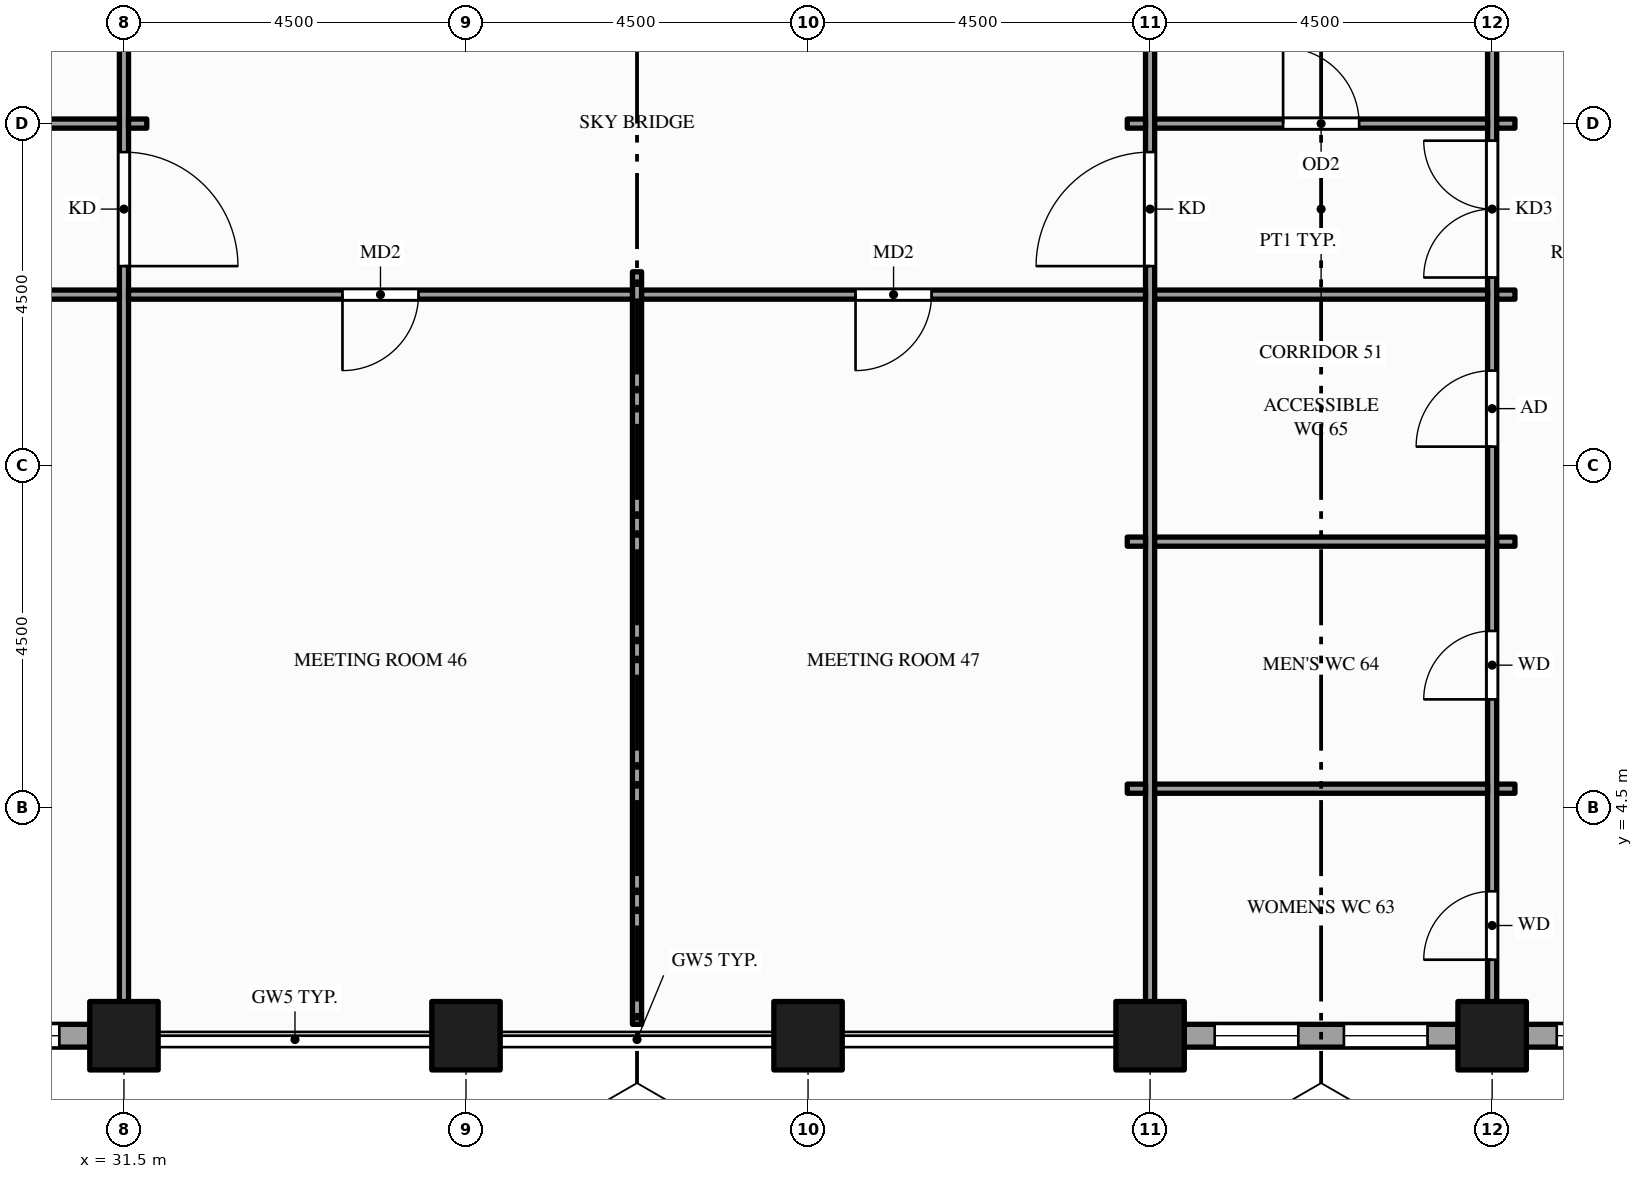
"""IFC4 building model, lengths in metres.
Left out: names, types, materials, properties, quantities, classifications, styles, units other than length and angle.
Written with IfcOpenShell. Run it as: python <this file> out.ifc"""

import sys

from ifc_helpers import new_model, si_unit, direction, frame, frame_2d, origin, origin_2d, place, context, subcontext, project, spatial, rectangle, hollow_rectangle, extrude, element, fill, save


model = new_model("IFC4")
c1 = context("Model", 3, precision=1e-05, world=origin(), true_north=direction((0.0, 1.0)))
c2 = subcontext(c1, "Body", "Model", "MODEL_VIEW")
j1 = project(units=[si_unit("LENGTHUNIT", "METRE"), si_unit("PLANEANGLEUNIT", "RADIAN")], contexts=[c1])
p1 = place(None, origin())
s1 = spatial("IfcSite", under=j1, at=p1, CompositionType="ELEMENT")
p2 = place(p1, origin())
s2 = spatial("IfcBuilding", under=s1, at=p2, CompositionType="ELEMENT")
p3 = place(p2, frame((0.0, 0.0, 155.0)))
s3 = spatial("IfcBuildingStorey", under=s2, at=p3, CompositionType="ELEMENT", Elevation=155.0)
for number, where, z_axis, x_axis in (
    (1, (31.5, 1.5, -0.15), (0.0, 0.0, 1.0), (1.0, 0.0, 0.0)),
    (2, (36.0, 1.5, -0.15), (0.0, 0.0, 1.0), (1.0, 0.0, 0.0)),
    (3, (40.5, 1.5, -0.15), (0.0, 0.0, 1.0), (1.0, 0.0, 0.0)),
    (4, (45.0, 1.5, -0.15), (0.0, 0.0, 1.0), (1.0, 0.0, 0.0)),
    (5, (49.5, 1.5, -0.15), (0.0, 0.0, 1.0), (1.0, 0.0, 0.0)),
):
    element("IfcColumn", number, at=place(p3, frame(where, z_axis=z_axis, x_axis=x_axis)), inside=s3, PredefinedType="COLUMN", context=c2, shape_type="SweptSolid", body=[
        extrude(hollow_rectangle(XDim=0.9, YDim=0.9, WallThickness=0.045, at=origin_2d()), origin(), (0.0, 0.0, 1.0), 4.0),
    ])
p4 = place(p3, frame((27.45, 1.5, 0.0), z_axis=(0.0, 0.0, 1.0), x_axis=(1.0, 0.0, 0.0)))
e6 = element("IfcWall", 6, at=p4, inside=s3, PredefinedType="STANDARD", context=c2, shape_type="SweptSolid", body=[
    extrude(rectangle(XDim=3.6, YDim=0.3, at=frame_2d((1.8, 0.0))), origin(), (0.0, 0.0, 1.0), 2.87),
])
p5 = place(p4, frame((0.4, 0.0, 0.9)))
e7 = element("IfcOpeningElement", 7, at=p5, cuts=e6, PredefinedType="OPENING", context=c2, shape_type="SweptSolid", body=[
    extrude(rectangle(XDim=1.1, YDim=1.75, at=frame_2d((0.55, 0.875))), frame((0.0, 0.16, 0.0), z_axis=(0.0, -1.0, 0.0), x_axis=(1.0, 0.0, 0.0)), (0.0, 0.0, 1.0), 0.32),
])
p6 = place(p4, frame((2.1, 0.0, 0.9)))
e8 = element("IfcOpeningElement", 8, at=p6, cuts=e6, PredefinedType="OPENING", context=c2, shape_type="SweptSolid", body=[
    extrude(rectangle(XDim=1.1, YDim=1.75, at=frame_2d((0.55, 0.875))), frame((0.0, 0.16, 0.0), z_axis=(0.0, -1.0, 0.0), x_axis=(1.0, 0.0, 0.0)), (0.0, 0.0, 1.0), 0.32),
])
p7 = place(p3, frame((45.45, 1.5, 0.0), z_axis=(0.0, 0.0, 1.0), x_axis=(1.0, 0.0, 0.0)))
e9 = element("IfcWall", 9, at=p7, inside=s3, PredefinedType="STANDARD", context=c2, shape_type="SweptSolid", body=[
    extrude(rectangle(XDim=3.6, YDim=0.3, at=frame_2d((1.8, 0.0))), origin(), (0.0, 0.0, 1.0), 2.87),
])
p8 = place(p7, frame((0.4, 0.0, 0.9)))
e10 = element("IfcOpeningElement", 10, at=p8, cuts=e9, PredefinedType="OPENING", context=c2, shape_type="SweptSolid", body=[
    extrude(rectangle(XDim=1.1, YDim=1.75, at=frame_2d((0.55, 0.875))), frame((0.0, 0.16, 0.0), z_axis=(0.0, -1.0, 0.0), x_axis=(1.0, 0.0, 0.0)), (0.0, 0.0, 1.0), 0.32),
])
p9 = place(p7, frame((2.1, 0.0, 0.9)))
e11 = element("IfcOpeningElement", 11, at=p9, cuts=e9, PredefinedType="OPENING", context=c2, shape_type="SweptSolid", body=[
    extrude(rectangle(XDim=1.1, YDim=1.75, at=frame_2d((0.55, 0.875))), frame((0.0, 0.16, 0.0), z_axis=(0.0, -1.0, 0.0), x_axis=(1.0, 0.0, 0.0)), (0.0, 0.0, 1.0), 0.32),
])
p10 = place(p3, frame((49.95, 1.5, 0.0), z_axis=(0.0, 0.0, 1.0), x_axis=(1.0, 0.0, 0.0)))
e12 = element("IfcWall", 12, at=p10, inside=s3, PredefinedType="STANDARD", context=c2, shape_type="SweptSolid", body=[
    extrude(rectangle(XDim=4.05, YDim=0.3, at=frame_2d((2.025, 0.0))), origin(), (0.0, 0.0, 1.0), 2.87),
])
p11 = place(p10, frame((0.4, 0.0, 0.9)))
e13 = element("IfcOpeningElement", 13, at=p11, cuts=e12, PredefinedType="OPENING", context=c2, shape_type="SweptSolid", body=[
    extrude(rectangle(XDim=1.1, YDim=1.75, at=frame_2d((0.55, 0.875))), frame((0.0, 0.16, 0.0), z_axis=(0.0, -1.0, 0.0), x_axis=(1.0, 0.0, 0.0)), (0.0, 0.0, 1.0), 0.32),
])
p12 = place(p10, frame((2.1, 0.0, 0.9)))
e14 = element("IfcOpeningElement", 14, at=p12, cuts=e12, PredefinedType="OPENING", context=c2, shape_type="SweptSolid", body=[
    extrude(rectangle(XDim=1.55, YDim=1.75, at=frame_2d((0.775, 0.875))), frame((0.0, 0.16, 0.0), z_axis=(0.0, -1.0, 0.0), x_axis=(1.0, 0.0, 0.0)), (0.0, 0.0, 1.0), 0.32),
])
p13 = place(p3, frame((31.5, 1.65, 0.0), z_axis=(0.0, 0.0, 1.0), x_axis=(0.0, 1.0, 0.0)))
e15 = element("IfcWall", 15, at=p13, inside=s3, PredefinedType="PARTITIONING", context=c2, shape_type="SweptSolid", body=[
    extrude(rectangle(XDim=22.2, YDim=0.12, at=frame_2d((11.1, 0.0))), origin(), (0.0, 0.0, 1.0), 2.87),
])
p14 = place(p13, frame((9.975, 0.0, 0.0)))
e16 = element("IfcOpeningElement", 16, at=p14, cuts=e15, PredefinedType="OPENING", context=c2, shape_type="SweptSolid", body=[
    extrude(rectangle(XDim=1.5, YDim=2.1, at=frame_2d((0.75, 1.05))), frame((0.0, 0.07, 0.0), z_axis=(0.0, -1.0, 0.0), x_axis=(1.0, 0.0, 0.0)), (0.0, 0.0, 1.0), 0.14),
])
p15 = place(p3, frame((38.25, 1.65, 0.0), z_axis=(0.0, 0.0, 1.0), x_axis=(0.0, 1.0, 0.0)))
e17 = element("IfcWall", 17, at=p15, inside=s3, PredefinedType="PARTITIONING", context=c2, shape_type="SweptSolid", body=[
    extrude(rectangle(XDim=9.9, YDim=0.12, at=frame_2d((4.95, 0.0))), origin(), (0.0, 0.0, 1.0), 2.87),
])
p16 = place(p3, frame((45.0, 1.65, 0.0), z_axis=(0.0, 0.0, 1.0), x_axis=(0.0, 1.0, 0.0)))
e18 = element("IfcWall", 18, at=p16, inside=s3, PredefinedType="PARTITIONING", context=c2, shape_type="SweptSolid", body=[
    extrude(rectangle(XDim=22.2, YDim=0.12, at=frame_2d((11.1, 0.0))), origin(), (0.0, 0.0, 1.0), 2.87),
])
p17 = place(p16, frame((9.975, 0.0, 0.0)))
e19 = element("IfcOpeningElement", 19, at=p17, cuts=e18, PredefinedType="OPENING", context=c2, shape_type="SweptSolid", body=[
    extrude(rectangle(XDim=1.5, YDim=2.1, at=frame_2d((0.75, 1.05))), frame((0.0, 0.07, 0.0), z_axis=(0.0, -1.0, 0.0), x_axis=(1.0, 0.0, 0.0)), (0.0, 0.0, 1.0), 0.14),
])
p18 = place(p3, frame((49.5, 1.65, 0.0), z_axis=(0.0, 0.0, 1.0), x_axis=(0.0, 1.0, 0.0)))
e20 = element("IfcWall", 20, at=p18, inside=s3, PredefinedType="PARTITIONING", context=c2, shape_type="SweptSolid", body=[
    extrude(rectangle(XDim=22.2, YDim=0.12, at=frame_2d((11.1, 0.0))), origin(), (0.0, 0.0, 1.0), 2.87),
])
p19 = place(p18, frame((9.825, 0.0, 0.0)))
e21 = element("IfcOpeningElement", 21, at=p19, cuts=e20, PredefinedType="OPENING", context=c2, shape_type="SweptSolid", body=[
    extrude(rectangle(XDim=1.8, YDim=2.1, at=frame_2d((0.9, 1.05))), frame((0.0, 0.07, 0.0), z_axis=(0.0, -1.0, 0.0), x_axis=(1.0, 0.0, 0.0)), (0.0, 0.0, 1.0), 0.14),
])
p20 = place(p18, frame((0.85, 0.0, 0.0)))
e22 = element("IfcOpeningElement", 22, at=p20, cuts=e20, PredefinedType="OPENING", context=c2, shape_type="SweptSolid", body=[
    extrude(rectangle(XDim=0.9, YDim=2.1, at=frame_2d((0.45, 1.05))), frame((0.0, 0.07, 0.0), z_axis=(0.0, -1.0, 0.0), x_axis=(1.0, 0.0, 0.0)), (0.0, 0.0, 1.0), 0.14),
])
p21 = place(p18, frame((4.275, 0.0, 0.0)))
e23 = element("IfcOpeningElement", 23, at=p21, cuts=e20, PredefinedType="OPENING", context=c2, shape_type="SweptSolid", body=[
    extrude(rectangle(XDim=0.9, YDim=2.1, at=frame_2d((0.45, 1.05))), frame((0.0, 0.07, 0.0), z_axis=(0.0, -1.0, 0.0), x_axis=(1.0, 0.0, 0.0)), (0.0, 0.0, 1.0), 0.14),
])
p22 = place(p18, frame((7.6, 0.0, 0.0)))
e24 = element("IfcOpeningElement", 24, at=p22, cuts=e20, PredefinedType="OPENING", context=c2, shape_type="SweptSolid", body=[
    extrude(rectangle(XDim=1.0, YDim=2.1, at=frame_2d((0.5, 1.05))), frame((0.0, 0.07, 0.0), z_axis=(0.0, -1.0, 0.0), x_axis=(1.0, 0.0, 0.0)), (0.0, 0.0, 1.0), 0.14),
])
p23 = place(p3, frame((44.7, 4.75, 0.0), z_axis=(0.0, 0.0, 1.0), x_axis=(1.0, 0.0, 0.0)))
e25 = element("IfcWall", 25, at=p23, inside=s3, PredefinedType="PARTITIONING", context=c2, shape_type="SweptSolid", body=[
    extrude(rectangle(XDim=0.24, YDim=0.12, at=frame_2d((0.12, 0.0))), origin(), (0.0, 0.0, 1.0), 2.87),
])
p24 = place(p3, frame((45.06, 4.75, 0.0), z_axis=(0.0, 0.0, 1.0), x_axis=(1.0, 0.0, 0.0)))
e26 = element("IfcWall", 26, at=p24, inside=s3, PredefinedType="PARTITIONING", context=c2, shape_type="SweptSolid", body=[
    extrude(rectangle(XDim=4.38, YDim=0.12, at=frame_2d((2.19, 0.0))), origin(), (0.0, 0.0, 1.0), 2.87),
])
for number, where, z_axis, x_axis in (
    (27, (49.56, 4.75, 0.0), (0.0, 0.0, 1.0), (1.0, 0.0, 0.0)),
    (28, (44.7, 8.0, 0.0), (0.0, 0.0, 1.0), (1.0, 0.0, 0.0)),
):
    element("IfcWall", number, at=place(p3, frame(where, z_axis=z_axis, x_axis=x_axis)), inside=s3, PredefinedType="PARTITIONING", context=c2, shape_type="SweptSolid", body=[
        extrude(rectangle(XDim=0.24, YDim=0.12, at=frame_2d((0.12, 0.0))), origin(), (0.0, 0.0, 1.0), 2.87),
    ])
p25 = place(p3, frame((45.06, 8.0, 0.0), z_axis=(0.0, 0.0, 1.0), x_axis=(1.0, 0.0, 0.0)))
e29 = element("IfcWall", 29, at=p25, inside=s3, PredefinedType="PARTITIONING", context=c2, shape_type="SweptSolid", body=[
    extrude(rectangle(XDim=4.38, YDim=0.12, at=frame_2d((2.19, 0.0))), origin(), (0.0, 0.0, 1.0), 2.87),
])
p26 = place(p3, frame((49.56, 8.0, 0.0), z_axis=(0.0, 0.0, 1.0), x_axis=(1.0, 0.0, 0.0)))
e30 = element("IfcWall", 30, at=p26, inside=s3, PredefinedType="PARTITIONING", context=c2, shape_type="SweptSolid", body=[
    extrude(rectangle(XDim=0.24, YDim=0.12, at=frame_2d((0.12, 0.0))), origin(), (0.0, 0.0, 1.0), 2.87),
])
p27 = place(p3, frame((27.06, 11.25, 0.0), z_axis=(0.0, 0.0, 1.0), x_axis=(1.0, 0.0, 0.0)))
e31 = element("IfcWall", 31, at=p27, inside=s3, PredefinedType="PARTITIONING", context=c2, shape_type="SweptSolid", body=[
    extrude(rectangle(XDim=4.38, YDim=0.12, at=frame_2d((2.19, 0.0))), origin(), (0.0, 0.0, 1.0), 2.87),
])
p28 = place(p27, frame((1.74, 0.0, 0.0)))
e32 = element("IfcOpeningElement", 32, at=p28, cuts=e31, PredefinedType="OPENING", context=c2, shape_type="SweptSolid", body=[
    extrude(rectangle(XDim=0.9, YDim=2.1, at=frame_2d((0.45, 1.05))), frame((0.0, 0.07, 0.0), z_axis=(0.0, -1.0, 0.0), x_axis=(1.0, 0.0, 0.0)), (0.0, 0.0, 1.0), 0.14),
])
p29 = place(p3, frame((31.56, 11.25, 0.0), z_axis=(0.0, 0.0, 1.0), x_axis=(1.0, 0.0, 0.0)))
e33 = element("IfcWall", 33, at=p29, inside=s3, PredefinedType="PARTITIONING", context=c2, shape_type="SweptSolid", body=[
    extrude(rectangle(XDim=6.63, YDim=0.12, at=frame_2d((3.315, 0.0))), origin(), (0.0, 0.0, 1.0), 2.87),
])
p30 = place(p29, frame((2.815, 0.0, 0.0)))
e34 = element("IfcOpeningElement", 34, at=p30, cuts=e33, PredefinedType="OPENING", context=c2, shape_type="SweptSolid", body=[
    extrude(rectangle(XDim=1.0, YDim=2.1, at=frame_2d((0.5, 1.05))), frame((0.0, 0.07, 0.0), z_axis=(0.0, -1.0, 0.0), x_axis=(1.0, 0.0, 0.0)), (0.0, 0.0, 1.0), 0.14),
])
p31 = place(p3, frame((38.31, 11.25, 0.0), z_axis=(0.0, 0.0, 1.0), x_axis=(1.0, 0.0, 0.0)))
e35 = element("IfcWall", 35, at=p31, inside=s3, PredefinedType="PARTITIONING", context=c2, shape_type="SweptSolid", body=[
    extrude(rectangle(XDim=6.63, YDim=0.12, at=frame_2d((3.315, 0.0))), origin(), (0.0, 0.0, 1.0), 2.87),
])
p32 = place(p31, frame((2.815, 0.0, 0.0)))
e36 = element("IfcOpeningElement", 36, at=p32, cuts=e35, PredefinedType="OPENING", context=c2, shape_type="SweptSolid", body=[
    extrude(rectangle(XDim=1.0, YDim=2.1, at=frame_2d((0.5, 1.05))), frame((0.0, 0.07, 0.0), z_axis=(0.0, -1.0, 0.0), x_axis=(1.0, 0.0, 0.0)), (0.0, 0.0, 1.0), 0.14),
])
p33 = place(p3, frame((45.06, 11.25, 0.0), z_axis=(0.0, 0.0, 1.0), x_axis=(1.0, 0.0, 0.0)))
e37 = element("IfcWall", 37, at=p33, inside=s3, PredefinedType="PARTITIONING", context=c2, shape_type="SweptSolid", body=[
    extrude(rectangle(XDim=4.38, YDim=0.12, at=frame_2d((2.19, 0.0))), origin(), (0.0, 0.0, 1.0), 2.87),
])
p34 = place(p3, frame((49.56, 11.25, 0.0), z_axis=(0.0, 0.0, 1.0), x_axis=(1.0, 0.0, 0.0)))
e38 = element("IfcWall", 38, at=p34, inside=s3, PredefinedType="PARTITIONING", context=c2, shape_type="SweptSolid", body=[
    extrude(rectangle(XDim=0.24, YDim=0.12, at=frame_2d((0.12, 0.0))), origin(), (0.0, 0.0, 1.0), 2.87),
])
p35 = place(p3, frame((11.31, 13.5, 0.0), z_axis=(0.0, 0.0, 1.0), x_axis=(1.0, 0.0, 0.0)))
e39 = element("IfcWall", 39, at=p35, inside=s3, PredefinedType="PARTITIONING", context=c2, shape_type="SweptSolid", body=[
    extrude(rectangle(XDim=20.13, YDim=0.12, at=frame_2d((10.065, 0.0))), origin(), (0.0, 0.0, 1.0), 2.87),
])
p36 = place(p35, frame((9.165, 0.0, 0.0)))
e40 = element("IfcOpeningElement", 40, at=p36, cuts=e39, PredefinedType="OPENING", context=c2, shape_type="SweptSolid", body=[
    extrude(rectangle(XDim=1.8, YDim=2.1, at=frame_2d((0.9, 1.05))), frame((0.0, 0.07, 0.0), z_axis=(0.0, -1.0, 0.0), x_axis=(1.0, 0.0, 0.0)), (0.0, 0.0, 1.0), 0.14),
])
for number, where, z_axis, x_axis in (
    (41, (31.56, 13.5, 0.0), (0.0, 0.0, 1.0), (1.0, 0.0, 0.0)),
    (42, (44.7, 13.5, 0.0), (0.0, 0.0, 1.0), (1.0, 0.0, 0.0)),
):
    element("IfcWall", number, at=place(p3, frame(where, z_axis=z_axis, x_axis=x_axis)), inside=s3, PredefinedType="PARTITIONING", context=c2, shape_type="SweptSolid", body=[
        extrude(rectangle(XDim=0.24, YDim=0.12, at=frame_2d((0.12, 0.0))), origin(), (0.0, 0.0, 1.0), 2.87),
    ])
p37 = place(p3, frame((45.06, 13.5, 0.0), z_axis=(0.0, 0.0, 1.0), x_axis=(1.0, 0.0, 0.0)))
e43 = element("IfcWall", 43, at=p37, inside=s3, PredefinedType="PARTITIONING", context=c2, shape_type="SweptSolid", body=[
    extrude(rectangle(XDim=4.38, YDim=0.12, at=frame_2d((2.19, 0.0))), origin(), (0.0, 0.0, 1.0), 2.87),
])
p38 = place(p37, frame((1.69, 0.0, 0.0)))
e44 = element("IfcOpeningElement", 44, at=p38, cuts=e43, PredefinedType="OPENING", context=c2, shape_type="SweptSolid", body=[
    extrude(rectangle(XDim=1.0, YDim=2.1, at=frame_2d((0.5, 1.05))), frame((0.0, 0.07, 0.0), z_axis=(0.0, -1.0, 0.0), x_axis=(1.0, 0.0, 0.0)), (0.0, 0.0, 1.0), 0.14),
])
p39 = place(p3, frame((49.56, 13.5, 0.0), z_axis=(0.0, 0.0, 1.0), x_axis=(1.0, 0.0, 0.0)))
e45 = element("IfcWall", 45, at=p39, inside=s3, PredefinedType="PARTITIONING", context=c2, shape_type="SweptSolid", body=[
    extrude(rectangle(XDim=0.24, YDim=0.12, at=frame_2d((0.12, 0.0))), origin(), (0.0, 0.0, 1.0), 2.87),
])
p40 = place(p6, origin())
e46 = element("IfcWindow", 46, at=p40, inside=s3, PartitioningType="SINGLE_PANEL", PredefinedType="WINDOW", context=c2, shape_type="SweptSolid", body=[
    extrude(rectangle(XDim=1.1, YDim=1.75, at=frame_2d((0.55, 0.875))), frame((0.0, 0.03, 0.0), z_axis=(0.0, -1.0, 0.0), x_axis=(1.0, 0.0, 0.0)), (0.0, 0.0, 1.0), 0.06),
])
fill(e8, e46)
p41 = place(p8, origin())
e47 = element("IfcWindow", 47, at=p41, inside=s3, PartitioningType="SINGLE_PANEL", PredefinedType="WINDOW", context=c2, shape_type="SweptSolid", body=[
    extrude(rectangle(XDim=1.1, YDim=1.75, at=frame_2d((0.55, 0.875))), frame((0.0, 0.03, 0.0), z_axis=(0.0, -1.0, 0.0), x_axis=(1.0, 0.0, 0.0)), (0.0, 0.0, 1.0), 0.06),
])
fill(e10, e47)
p42 = place(p9, origin())
e48 = element("IfcWindow", 48, at=p42, inside=s3, PartitioningType="SINGLE_PANEL", PredefinedType="WINDOW", context=c2, shape_type="SweptSolid", body=[
    extrude(rectangle(XDim=1.1, YDim=1.75, at=frame_2d((0.55, 0.875))), frame((0.0, 0.03, 0.0), z_axis=(0.0, -1.0, 0.0), x_axis=(1.0, 0.0, 0.0)), (0.0, 0.0, 1.0), 0.06),
])
fill(e11, e48)
p43 = place(p11, origin())
e49 = element("IfcWindow", 49, at=p43, inside=s3, PartitioningType="SINGLE_PANEL", PredefinedType="WINDOW", context=c2, shape_type="SweptSolid", body=[
    extrude(rectangle(XDim=1.1, YDim=1.75, at=frame_2d((0.55, 0.875))), frame((0.0, 0.03, 0.0), z_axis=(0.0, -1.0, 0.0), x_axis=(1.0, 0.0, 0.0)), (0.0, 0.0, 1.0), 0.06),
])
fill(e13, e49)
p44 = place(p14, origin())
e50 = element("IfcDoor", 50, at=p44, inside=s3, OperationType="SINGLE_SWING_LEFT", PredefinedType="DOOR", context=c2, shape_type="SweptSolid", body=[
    extrude(rectangle(XDim=1.5, YDim=2.1, at=frame_2d((0.75, 1.05))), frame((0.0, 0.025, 0.0), z_axis=(0.0, -1.0, 0.0), x_axis=(1.0, 0.0, 0.0)), (0.0, 0.0, 1.0), 0.05),
])
fill(e16, e50)
p45 = place(p17, origin())
e51 = element("IfcDoor", 51, at=p45, inside=s3, OperationType="SINGLE_SWING_LEFT", PredefinedType="DOOR", context=c2, shape_type="SweptSolid", body=[
    extrude(rectangle(XDim=1.5, YDim=2.1, at=frame_2d((0.75, 1.05))), frame((0.0, 0.025, 0.0), z_axis=(0.0, -1.0, 0.0), x_axis=(1.0, 0.0, 0.0)), (0.0, 0.0, 1.0), 0.05),
])
fill(e19, e51)
p46 = place(p19, origin())
e52 = element("IfcDoor", 52, at=p46, inside=s3, OperationType="DOUBLE_DOOR_SINGLE_SWING", PredefinedType="DOOR", context=c2, shape_type="SweptSolid", body=[
    extrude(rectangle(XDim=1.8, YDim=2.1, at=frame_2d((0.9, 1.05))), frame((0.0, 0.025, 0.0), z_axis=(0.0, -1.0, 0.0), x_axis=(1.0, 0.0, 0.0)), (0.0, 0.0, 1.0), 0.05),
])
fill(e21, e52)
p47 = place(p30, origin())
e53 = element("IfcDoor", 53, at=p47, inside=s3, OperationType="SINGLE_SWING_LEFT", PredefinedType="DOOR", context=c2, shape_type="SweptSolid", body=[
    extrude(rectangle(XDim=1.0, YDim=2.1, at=frame_2d((0.5, 1.05))), frame((0.0, 0.025, 0.0), z_axis=(0.0, -1.0, 0.0), x_axis=(1.0, 0.0, 0.0)), (0.0, 0.0, 1.0), 0.05),
])
fill(e34, e53)
p48 = place(p32, origin())
e54 = element("IfcDoor", 54, at=p48, inside=s3, OperationType="SINGLE_SWING_LEFT", PredefinedType="DOOR", context=c2, shape_type="SweptSolid", body=[
    extrude(rectangle(XDim=1.0, YDim=2.1, at=frame_2d((0.5, 1.05))), frame((0.0, 0.025, 0.0), z_axis=(0.0, -1.0, 0.0), x_axis=(1.0, 0.0, 0.0)), (0.0, 0.0, 1.0), 0.05),
])
fill(e36, e54)
p49 = place(p20, origin())
e55 = element("IfcDoor", 55, at=p49, inside=s3, OperationType="SINGLE_SWING_LEFT", PredefinedType="DOOR", context=c2, shape_type="SweptSolid", body=[
    extrude(rectangle(XDim=0.9, YDim=2.1, at=frame_2d((0.45, 1.05))), frame((0.0, 0.025, 0.0), z_axis=(0.0, -1.0, 0.0), x_axis=(1.0, 0.0, 0.0)), (0.0, 0.0, 1.0), 0.05),
])
fill(e22, e55)
p50 = place(p21, origin())
e56 = element("IfcDoor", 56, at=p50, inside=s3, OperationType="SINGLE_SWING_LEFT", PredefinedType="DOOR", context=c2, shape_type="SweptSolid", body=[
    extrude(rectangle(XDim=0.9, YDim=2.1, at=frame_2d((0.45, 1.05))), frame((0.0, 0.025, 0.0), z_axis=(0.0, -1.0, 0.0), x_axis=(1.0, 0.0, 0.0)), (0.0, 0.0, 1.0), 0.05),
])
fill(e23, e56)
p51 = place(p22, origin())
e57 = element("IfcDoor", 57, at=p51, inside=s3, OperationType="SINGLE_SWING_LEFT", PredefinedType="DOOR", context=c2, shape_type="SweptSolid", body=[
    extrude(rectangle(XDim=1.0, YDim=2.1, at=frame_2d((0.5, 1.05))), frame((0.0, 0.025, 0.0), z_axis=(0.0, -1.0, 0.0), x_axis=(1.0, 0.0, 0.0)), (0.0, 0.0, 1.0), 0.05),
])
fill(e24, e57)
p52 = place(p38, origin())
e58 = element("IfcDoor", 58, at=p52, inside=s3, OperationType="SINGLE_SWING_LEFT", PredefinedType="DOOR", context=c2, shape_type="SweptSolid", body=[
    extrude(rectangle(XDim=1.0, YDim=2.1, at=frame_2d((0.5, 1.05))), frame((0.0, 0.025, 0.0), z_axis=(0.0, -1.0, 0.0), x_axis=(1.0, 0.0, 0.0)), (0.0, 0.0, 1.0), 0.05),
])
fill(e44, e58)
save(model, sys.argv[1])
